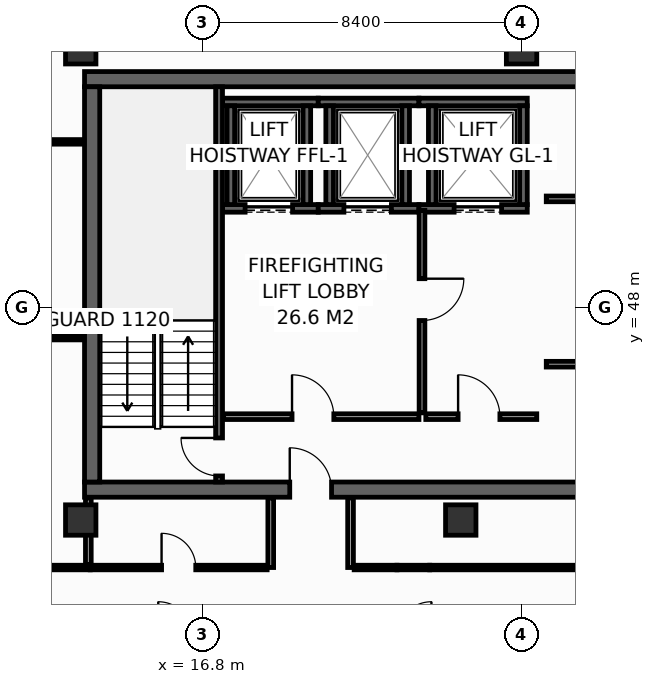
"""IFC4 building model, lengths in metres.
Left out: names, types, materials, properties, quantities, classifications, styles, units other than length and angle.
Written with IfcOpenShell. Run it as: python <this file> out.ifc"""

import sys

from ifc_helpers import new_model, si_unit, direction, frame, frame_2d, origin, origin_2d, place, context, subcontext, project, spatial, rectangle, hollow_rectangle, extrude, element, fill, save


model = new_model("IFC4")
c1 = context("Model", 3, precision=1e-05, world=origin(), true_north=direction((0.0, 1.0)))
c2 = subcontext(c1, "Body", "Model", "MODEL_VIEW")
j1 = project(units=[si_unit("LENGTHUNIT", "METRE"), si_unit("PLANEANGLEUNIT", "RADIAN")], contexts=[c1])
p1 = place(None, origin())
s1 = spatial("IfcSite", under=j1, at=p1, CompositionType="ELEMENT")
p2 = place(p1, origin())
s2 = spatial("IfcBuilding", under=s1, at=p2, CompositionType="ELEMENT")
p3 = place(p2, frame((0.0, 0.0, 249.6)))
s3 = spatial("IfcBuildingStorey", under=s2, at=p3, CompositionType="ELEMENT", Elevation=249.6)
p4 = place(p3, frame((13.7, 43.2, 0.0), z_axis=(0.0, 0.0, 1.0), x_axis=(1.0, 0.0, 0.0)))
e1 = element("IfcWall", 1, at=p4, inside=s3, PredefinedType="SHEAR", context=c2, shape_type="SweptSolid", body=[
    extrude(rectangle(XDim=32.5, YDim=0.4, at=frame_2d((16.25, 0.0))), origin(), (0.0, 0.0, 1.0), 3.35),
])
p5 = place(p4, frame((5.4, 0.0, 0.0)))
e2 = element("IfcOpeningElement", 2, at=p5, cuts=e1, PredefinedType="OPENING", context=c2, shape_type="SweptSolid", body=[
    extrude(rectangle(XDim=1.1, YDim=2.15, at=frame_2d((0.55, 1.075))), frame((0.0, 0.21, 0.0), z_axis=(0.0, -1.0, 0.0), x_axis=(1.0, 0.0, 0.0)), (0.0, 0.0, 1.0), 0.42),
])
p6 = place(p4, frame((25.6, 0.0, 0.0)))
e3 = element("IfcOpeningElement", 3, at=p6, cuts=e1, PredefinedType="OPENING", context=c2, shape_type="SweptSolid", body=[
    extrude(rectangle(XDim=1.1, YDim=2.15, at=frame_2d((0.55, 1.075))), frame((0.0, 0.21, 0.0), z_axis=(0.0, -1.0, 0.0), x_axis=(1.0, 0.0, 0.0)), (0.0, 0.0, 1.0), 0.42),
])
p7 = place(p3, frame((13.7, 54.0, 0.0), z_axis=(0.0, 0.0, 1.0), x_axis=(1.0, 0.0, 0.0)))
e4 = element("IfcWall", 4, at=p7, inside=s3, PredefinedType="SHEAR", context=c2, shape_type="SweptSolid", body=[
    extrude(rectangle(XDim=32.5, YDim=0.4, at=frame_2d((16.25, 0.0))), origin(), (0.0, 0.0, 1.0), 3.35),
])
p8 = place(p3, frame((13.9, 43.4, 0.0), z_axis=(0.0, 0.0, 1.0), x_axis=(0.0, 1.0, 0.0)))
e5 = element("IfcWall", 5, at=p8, inside=s3, PredefinedType="SHEAR", context=c2, shape_type="SweptSolid", body=[
    extrude(rectangle(XDim=10.4, YDim=0.4, at=frame_2d((5.2, 0.0))), origin(), (0.0, 0.0, 1.0), 3.35),
])
for number, where, z_axis, x_axis in (
    (6, (13.6, 54.8, 0.0), (0.0, 0.0, 1.0), (1.0, 0.0, 0.0)),
    (7, (25.2, 54.8, 0.0), (0.0, 0.0, 1.0), (1.0, 0.0, 0.0)),
    (8, (13.6, 42.4, 0.0), (0.0, 0.0, 1.0), (1.0, 0.0, 0.0)),
    (9, (23.6, 42.4, 0.0), (0.0, 0.0, 1.0), (1.0, 0.0, 0.0)),
):
    element("IfcColumn", number, at=place(p3, frame(where, z_axis=z_axis, x_axis=x_axis)), inside=s3, PredefinedType="COLUMN", context=c2, shape_type="SweptSolid", body=[
        extrude(hollow_rectangle(XDim=0.8, YDim=0.8, WallThickness=0.036, at=origin_2d()), origin(), (0.0, 0.0, 1.0), 3.8),
    ])
p9 = place(p3, frame((17.33, 50.6, 0.0), z_axis=(0.0, 0.0, 1.0), x_axis=(1.0, 0.0, 0.0)))
e10 = element("IfcWall", 10, at=p9, inside=s3, PredefinedType="SHEAR", context=c2, shape_type="SweptSolid", body=[
    extrude(rectangle(XDim=2.52, YDim=0.2, at=frame_2d((1.26, 0.0))), origin(), (0.0, 0.0, 1.0), 3.35),
])
p10 = place(p9, frame((0.595, 0.0, 0.0)))
e11 = element("IfcOpeningElement", 11, at=p10, cuts=e10, PredefinedType="OPENING", context=c2, shape_type="SweptSolid", body=[
    extrude(rectangle(XDim=1.25, YDim=2.3, at=frame_2d((0.625, 1.15))), frame((0.0, 0.11, 0.0), z_axis=(0.0, -1.0, 0.0), x_axis=(1.0, 0.0, 0.0)), (0.0, 0.0, 1.0), 0.22),
])
p11 = place(p3, frame((17.33, 53.4, 0.0), z_axis=(0.0, 0.0, 1.0), x_axis=(1.0, 0.0, 0.0)))
e12 = element("IfcWall", 12, at=p11, inside=s3, PredefinedType="SHEAR", context=c2, shape_type="SweptSolid", body=[
    extrude(rectangle(XDim=2.52, YDim=0.2, at=frame_2d((1.26, 0.0))), origin(), (0.0, 0.0, 1.0), 3.35),
])
for number, where, z_axis, x_axis in (
    (13, (17.55, 50.7, 0.0), (0.0, 0.0, 1.0), (0.0, 1.0, 0.0)),
    (14, (19.55, 50.7, 0.0), (0.0, 0.0, 1.0), (0.0, 1.0, 0.0)),
):
    element("IfcWall", number, at=place(p3, frame(where, z_axis=z_axis, x_axis=x_axis)), inside=s3, PredefinedType="SHEAR", context=c2, shape_type="SweptSolid", body=[
        extrude(rectangle(XDim=2.6, YDim=0.2, at=frame_2d((1.3, 0.0))), origin(), (0.0, 0.0, 1.0), 3.35),
    ])
p12 = place(p3, frame((19.85, 50.6, 0.0), z_axis=(0.0, 0.0, 1.0), x_axis=(1.0, 0.0, 0.0)))
e15 = element("IfcWall", 15, at=p12, inside=s3, PredefinedType="SHEAR", context=c2, shape_type="SweptSolid", body=[
    extrude(rectangle(XDim=2.65, YDim=0.2, at=frame_2d((1.325, 0.0))), origin(), (0.0, 0.0, 1.0), 3.35),
])
p13 = place(p12, frame((0.675, 0.0, 0.0)))
e16 = element("IfcOpeningElement", 16, at=p13, cuts=e15, PredefinedType="OPENING", context=c2, shape_type="SweptSolid", body=[
    extrude(rectangle(XDim=1.25, YDim=2.3, at=frame_2d((0.625, 1.15))), frame((0.0, 0.11, 0.0), z_axis=(0.0, -1.0, 0.0), x_axis=(1.0, 0.0, 0.0)), (0.0, 0.0, 1.0), 0.22),
])
p14 = place(p3, frame((19.85, 53.4, 0.0), z_axis=(0.0, 0.0, 1.0), x_axis=(1.0, 0.0, 0.0)))
e17 = element("IfcWall", 17, at=p14, inside=s3, PredefinedType="SHEAR", context=c2, shape_type="SweptSolid", body=[
    extrude(rectangle(XDim=2.65, YDim=0.2, at=frame_2d((1.325, 0.0))), origin(), (0.0, 0.0, 1.0), 3.35),
])
for number, where, z_axis, x_axis in (
    (18, (20.15, 50.7, 0.0), (0.0, 0.0, 1.0), (0.0, 1.0, 0.0)),
    (19, (22.15, 50.7, 0.0), (0.0, 0.0, 1.0), (0.0, 1.0, 0.0)),
):
    element("IfcWall", number, at=place(p3, frame(where, z_axis=z_axis, x_axis=x_axis)), inside=s3, PredefinedType="SHEAR", context=c2, shape_type="SweptSolid", body=[
        extrude(rectangle(XDim=2.6, YDim=0.2, at=frame_2d((1.3, 0.0))), origin(), (0.0, 0.0, 1.0), 3.35),
    ])
p15 = place(p3, frame((22.5, 50.6, 0.0), z_axis=(0.0, 0.0, 1.0), x_axis=(1.0, 0.0, 0.0)))
e20 = element("IfcWall", 20, at=p15, inside=s3, PredefinedType="SHEAR", context=c2, shape_type="SweptSolid", body=[
    extrude(rectangle(XDim=2.85, YDim=0.2, at=frame_2d((1.425, 0.0))), origin(), (0.0, 0.0, 1.0), 3.35),
])
p16 = place(p15, frame((0.925, 0.0, 0.0)))
e21 = element("IfcOpeningElement", 21, at=p16, cuts=e20, PredefinedType="OPENING", context=c2, shape_type="SweptSolid", body=[
    extrude(rectangle(XDim=1.25, YDim=2.3, at=frame_2d((0.625, 1.15))), frame((0.0, 0.11, 0.0), z_axis=(0.0, -1.0, 0.0), x_axis=(1.0, 0.0, 0.0)), (0.0, 0.0, 1.0), 0.22),
])
p17 = place(p3, frame((22.5, 53.4, 0.0), z_axis=(0.0, 0.0, 1.0), x_axis=(1.0, 0.0, 0.0)))
e22 = element("IfcWall", 22, at=p17, inside=s3, PredefinedType="SHEAR", context=c2, shape_type="SweptSolid", body=[
    extrude(rectangle(XDim=2.85, YDim=0.2, at=frame_2d((1.425, 0.0))), origin(), (0.0, 0.0, 1.0), 3.35),
])
for number, where, z_axis, x_axis in (
    (23, (22.85, 50.7, 0.0), (0.0, 0.0, 1.0), (0.0, 1.0, 0.0)),
    (24, (25.25, 50.7, 0.0), (0.0, 0.0, 1.0), (0.0, 1.0, 0.0)),
):
    element("IfcWall", number, at=place(p3, frame(where, z_axis=z_axis, x_axis=x_axis)), inside=s3, PredefinedType="SHEAR", context=c2, shape_type="SweptSolid", body=[
        extrude(rectangle(XDim=2.6, YDim=0.2, at=frame_2d((1.3, 0.0))), origin(), (0.0, 0.0, 1.0), 3.35),
    ])
p18 = place(p3, frame((17.24, 43.4, 0.0), z_axis=(0.0, 0.0, 1.0), x_axis=(0.0, 1.0, 0.0)))
e25 = element("IfcWall", 25, at=p18, inside=s3, PredefinedType="SHEAR", context=c2, shape_type="SweptSolid", body=[
    extrude(rectangle(XDim=10.4, YDim=0.18, at=frame_2d((5.2, 0.0))), origin(), (0.0, 0.0, 1.0), 3.35),
])
p19 = place(p18, frame((0.16, 0.0, 0.0)))
e26 = element("IfcOpeningElement", 26, at=p19, cuts=e25, PredefinedType="OPENING", context=c2, shape_type="SweptSolid", body=[
    extrude(rectangle(XDim=1.0, YDim=2.15, at=frame_2d((0.5, 1.075))), frame((0.0, 0.1, 0.0), z_axis=(0.0, -1.0, 0.0), x_axis=(1.0, 0.0, 0.0)), (0.0, 0.0, 1.0), 0.2),
])
p20 = place(p3, frame((17.36, 45.12, 0.0), z_axis=(0.0, 0.0, 1.0), x_axis=(1.0, 0.0, 0.0)))
e27 = element("IfcWall", 27, at=p20, inside=s3, PredefinedType="PARTITIONING", context=c2, shape_type="SweptSolid", body=[
    extrude(rectangle(XDim=5.14, YDim=0.15, at=frame_2d((2.57, 0.0))), origin(), (0.0, 0.0, 1.0), 3.35),
])
p21 = place(p20, frame((1.8, 0.0, 0.0)))
e28 = element("IfcOpeningElement", 28, at=p21, cuts=e27, PredefinedType="OPENING", context=c2, shape_type="SweptSolid", body=[
    extrude(rectangle(XDim=1.1, YDim=2.15, at=frame_2d((0.55, 1.075))), frame((0.0, 0.085, 0.0), z_axis=(0.0, -1.0, 0.0), x_axis=(1.0, 0.0, 0.0)), (0.0, 0.0, 1.0), 0.17),
])
p22 = place(p3, frame((22.58, 50.55, 0.0), z_axis=(0.0, 0.0, 1.0), x_axis=(0.0, -1.0, 0.0)))
e29 = element("IfcWall", 29, at=p22, inside=s3, PredefinedType="PARTITIONING", context=c2, shape_type="SweptSolid", body=[
    extrude(rectangle(XDim=5.33, YDim=0.15, at=frame_2d((2.665, 0.0))), origin(), (0.0, 0.0, 1.0), 3.35),
])
p23 = place(p22, frame((1.8, 0.0, 0.0)))
e30 = element("IfcOpeningElement", 30, at=p23, cuts=e29, PredefinedType="OPENING", context=c2, shape_type="SweptSolid", body=[
    extrude(rectangle(XDim=1.1, YDim=2.15, at=frame_2d((0.55, 1.075))), frame((0.0, 0.085, 0.0), z_axis=(0.0, -1.0, 0.0), x_axis=(1.0, 0.0, 0.0)), (0.0, 0.0, 1.0), 0.17),
])
p24 = place(p3, frame((22.68, 45.12, 0.0), z_axis=(0.0, 0.0, 1.0), x_axis=(1.0, 0.0, 0.0)))
e31 = element("IfcWall", 31, at=p24, inside=s3, PredefinedType="PARTITIONING", context=c2, shape_type="SweptSolid", body=[
    extrude(rectangle(XDim=2.92, YDim=0.15, at=frame_2d((1.46, 0.0))), origin(), (0.0, 0.0, 1.0), 3.35),
])
p25 = place(p24, frame((0.85, 0.0, 0.0)))
e32 = element("IfcOpeningElement", 32, at=p25, cuts=e31, PredefinedType="OPENING", context=c2, shape_type="SweptSolid", body=[
    extrude(rectangle(XDim=1.1, YDim=2.15, at=frame_2d((0.55, 1.075))), frame((0.0, 0.085, 0.0), z_axis=(0.0, -1.0, 0.0), x_axis=(1.0, 0.0, 0.0)), (0.0, 0.0, 1.0), 0.17),
])
p26 = place(p3, frame((25.85, 50.85, 0.0), z_axis=(0.0, 0.0, 1.0), x_axis=(1.0, 0.0, 0.0)))
e33 = element("IfcWall", 33, at=p26, inside=s3, PredefinedType="PARTITIONING", context=c2, shape_type="SweptSolid", body=[
    extrude(rectangle(XDim=7.65, YDim=0.15, at=frame_2d((3.825, 0.0))), origin(), (0.0, 0.0, 1.0), 3.35),
])
p27 = place(p26, frame((1.25, 0.0, 0.0)))
e34 = element("IfcOpeningElement", 34, at=p27, cuts=e33, PredefinedType="OPENING", context=c2, shape_type="SweptSolid", body=[
    extrude(rectangle(XDim=0.95, YDim=2.15, at=frame_2d((0.475, 1.075))), frame((0.0, 0.085, 0.0), z_axis=(0.0, -1.0, 0.0), x_axis=(1.0, 0.0, 0.0)), (0.0, 0.0, 1.0), 0.17),
])
p28 = place(p3, frame((25.85, 46.5, 0.0), z_axis=(0.0, 0.0, 1.0), x_axis=(1.0, 0.0, 0.0)))
e35 = element("IfcWall", 35, at=p28, inside=s3, PredefinedType="PARTITIONING", context=c2, shape_type="SweptSolid", body=[
    extrude(rectangle(XDim=7.65, YDim=0.15, at=frame_2d((3.825, 0.0))), origin(), (0.0, 0.0, 1.0), 3.35),
])
p29 = place(p28, frame((2.8, 0.0, 0.0)))
e36 = element("IfcOpeningElement", 36, at=p29, cuts=e35, PredefinedType="OPENING", context=c2, shape_type="SweptSolid", body=[
    extrude(rectangle(XDim=0.95, YDim=2.15, at=frame_2d((0.475, 1.075))), frame((0.0, 0.085, 0.0), z_axis=(0.0, -1.0, 0.0), x_axis=(1.0, 0.0, 0.0)), (0.0, 0.0, 1.0), 0.17),
])
p30 = place(p3, frame((11.5, 41.15, 0.0), z_axis=(0.0, 0.0, 1.0), x_axis=(1.0, 0.0, 0.0)))
e37 = element("IfcWall", 37, at=p30, inside=s3, PredefinedType="PARTITIONING", context=c2, shape_type="SweptSolid", body=[
    extrude(rectangle(XDim=2.35, YDim=0.12, at=frame_2d((1.175, 0.0))), origin(), (0.0, 0.0, 1.0), 3.35),
])
for number, where, z_axis, x_axis in (
    (38, (11.55, 52.35, 0.0), (0.0, 0.0, 1.0), (1.0, 0.0, 0.0)),
    (39, (11.55, 47.2, 0.0), (0.0, 0.0, 1.0), (1.0, 0.0, 0.0)),
):
    element("IfcWall", number, at=place(p3, frame(where, z_axis=z_axis, x_axis=x_axis)), inside=s3, PredefinedType="PARTITIONING", context=c2, shape_type="SweptSolid", body=[
        extrude(rectangle(XDim=2.13, YDim=0.12, at=frame_2d((1.065, 0.0))), origin(), (0.0, 0.0, 1.0), 3.35),
    ])
p31 = place(p3, frame((13.8, 41.23, 0.0), z_axis=(0.0, 0.0, 1.0), x_axis=(0.0, 1.0, 0.0)))
e40 = element("IfcWall", 40, at=p31, inside=s3, PredefinedType="PARTITIONING", context=c2, shape_type="SweptSolid", body=[
    extrude(rectangle(XDim=1.75, YDim=0.15, at=frame_2d((0.875, 0.0))), origin(), (0.0, 0.0, 1.0), 3.35),
])
for number, where, z_axis, x_axis in (
    (41, (18.6, 41.15, 0.0), (0.0, 0.0, 1.0), (0.0, 1.0, 0.0)),
    (42, (20.7, 41.15, 0.0), (0.0, 0.0, 1.0), (0.0, 1.0, 0.0)),
):
    element("IfcWall", number, at=place(p3, frame(where, z_axis=z_axis, x_axis=x_axis)), inside=s3, PredefinedType="PARTITIONING", context=c2, shape_type="SweptSolid", body=[
        extrude(rectangle(XDim=1.83, YDim=0.15, at=frame_2d((0.915, 0.0))), origin(), (0.0, 0.0, 1.0), 3.35),
    ])
p32 = place(p3, frame((13.85, 41.15, 0.0), z_axis=(0.0, 0.0, 1.0), x_axis=(1.0, 0.0, 0.0)))
e43 = element("IfcWall", 43, at=p32, inside=s3, PredefinedType="PARTITIONING", context=c2, shape_type="SweptSolid", body=[
    extrude(rectangle(XDim=4.655, YDim=0.12, at=frame_2d((2.327, 0.0))), origin(), (0.0, 0.0, 1.0), 3.35),
])
p33 = place(p32, frame((1.877, 0.0, 0.0)))
e44 = element("IfcOpeningElement", 44, at=p33, cuts=e43, PredefinedType="OPENING", context=c2, shape_type="SweptSolid", body=[
    extrude(rectangle(XDim=0.9, YDim=2.1, at=frame_2d((0.45, 1.05))), frame((0.0, 0.07, 0.0), z_axis=(0.0, -1.0, 0.0), x_axis=(1.0, 0.0, 0.0)), (0.0, 0.0, 1.0), 0.14),
])
p34 = place(p3, frame((22.783, 41.15, 0.0), z_axis=(0.0, 0.0, 1.0), x_axis=(1.0, 0.0, 0.0)))
e45 = element("IfcWall", 45, at=p34, inside=s3, PredefinedType="PARTITIONING", context=c2, shape_type="SweptSolid", body=[
    extrude(rectangle(XDim=14.434, YDim=0.12, at=frame_2d((7.217, 0.0))), origin(), (0.0, 0.0, 1.0), 3.35),
])
p35 = place(p34, frame((6.767, 0.0, 0.0)))
e46 = element("IfcOpeningElement", 46, at=p35, cuts=e45, PredefinedType="OPENING", context=c2, shape_type="SweptSolid", body=[
    extrude(rectangle(XDim=0.9, YDim=2.1, at=frame_2d((0.45, 1.05))), frame((0.0, 0.07, 0.0), z_axis=(0.0, -1.0, 0.0), x_axis=(1.0, 0.0, 0.0)), (0.0, 0.0, 1.0), 0.14),
])
p36 = place(p3, frame((20.795, 41.15, 0.0), z_axis=(0.0, 0.0, 1.0), x_axis=(1.0, 0.0, 0.0)))
e47 = element("IfcWall", 47, at=p36, inside=s3, PredefinedType="PARTITIONING", context=c2, shape_type="SweptSolid", body=[
    extrude(rectangle(XDim=1.126, YDim=0.12, at=frame_2d((0.563, 0.0))), origin(), (0.0, 0.0, 1.0), 3.35),
])
p37 = place(p3, frame((21.921, 41.15, 0.0), z_axis=(0.0, 0.0, 1.0), x_axis=(1.0, 0.0, 0.0)))
e48 = element("IfcWall", 48, at=p37, inside=s3, PredefinedType="PARTITIONING", context=c2, shape_type="SweptSolid", body=[
    extrude(rectangle(XDim=0.862, YDim=0.12, at=frame_2d((0.431, 0.0))), origin(), (0.0, 0.0, 1.0), 1.935),
])
p38 = place(p10, origin())
e49 = element("IfcDoor", 49, at=p38, inside=s3, OperationType="SLIDING_TO_LEFT", PredefinedType="DOOR", context=c2, shape_type="SweptSolid", body=[
    extrude(rectangle(XDim=1.25, YDim=2.3, at=frame_2d((0.625, 1.15))), frame((0.0, 0.025, 0.0), z_axis=(0.0, -1.0, 0.0), x_axis=(1.0, 0.0, 0.0)), (0.0, 0.0, 1.0), 0.05),
])
fill(e11, e49)
p39 = place(p13, origin())
e50 = element("IfcDoor", 50, at=p39, inside=s3, OperationType="SLIDING_TO_LEFT", PredefinedType="DOOR", context=c2, shape_type="SweptSolid", body=[
    extrude(rectangle(XDim=1.25, YDim=2.3, at=frame_2d((0.625, 1.15))), frame((0.0, 0.025, 0.0), z_axis=(0.0, -1.0, 0.0), x_axis=(1.0, 0.0, 0.0)), (0.0, 0.0, 1.0), 0.05),
])
fill(e16, e50)
p40 = place(p16, origin())
e51 = element("IfcDoor", 51, at=p40, inside=s3, OperationType="SLIDING_TO_LEFT", PredefinedType="DOOR", context=c2, shape_type="SweptSolid", body=[
    extrude(rectangle(XDim=1.25, YDim=2.3, at=frame_2d((0.625, 1.15))), frame((0.0, 0.025, 0.0), z_axis=(0.0, -1.0, 0.0), x_axis=(1.0, 0.0, 0.0)), (0.0, 0.0, 1.0), 0.05),
])
fill(e21, e51)
p41 = place(p19, origin())
e52 = element("IfcDoor", 52, at=p41, inside=s3, OperationType="SINGLE_SWING_RIGHT", PredefinedType="DOOR", context=c2, shape_type="SweptSolid", body=[
    extrude(rectangle(XDim=1.0, YDim=2.15, at=frame_2d((0.5, 1.075))), frame((0.0, 0.025, 0.0), z_axis=(0.0, -1.0, 0.0), x_axis=(1.0, 0.0, 0.0)), (0.0, 0.0, 1.0), 0.05),
])
fill(e26, e52)
p42 = place(p21, origin())
e53 = element("IfcDoor", 53, at=p42, inside=s3, OperationType="SINGLE_SWING_LEFT", PredefinedType="DOOR", context=c2, shape_type="SweptSolid", body=[
    extrude(rectangle(XDim=1.1, YDim=2.15, at=frame_2d((0.55, 1.075))), frame((0.0, 0.025, 0.0), z_axis=(0.0, -1.0, 0.0), x_axis=(1.0, 0.0, 0.0)), (0.0, 0.0, 1.0), 0.05),
])
fill(e28, e53)
p43 = place(p23, origin())
e54 = element("IfcDoor", 54, at=p43, inside=s3, OperationType="SINGLE_SWING_LEFT", PredefinedType="DOOR", context=c2, shape_type="SweptSolid", body=[
    extrude(rectangle(XDim=1.1, YDim=2.15, at=frame_2d((0.55, 1.075))), frame((0.0, 0.025, 0.0), z_axis=(0.0, -1.0, 0.0), x_axis=(1.0, 0.0, 0.0)), (0.0, 0.0, 1.0), 0.05),
])
fill(e30, e54)
p44 = place(p25, origin())
e55 = element("IfcDoor", 55, at=p44, inside=s3, OperationType="SINGLE_SWING_LEFT", PredefinedType="DOOR", context=c2, shape_type="SweptSolid", body=[
    extrude(rectangle(XDim=1.1, YDim=2.15, at=frame_2d((0.55, 1.075))), frame((0.0, 0.025, 0.0), z_axis=(0.0, -1.0, 0.0), x_axis=(1.0, 0.0, 0.0)), (0.0, 0.0, 1.0), 0.05),
])
fill(e32, e55)
p45 = place(p5, origin())
e56 = element("IfcDoor", 56, at=p45, inside=s3, OperationType="SINGLE_SWING_LEFT", PredefinedType="DOOR", context=c2, shape_type="SweptSolid", body=[
    extrude(rectangle(XDim=1.1, YDim=2.15, at=frame_2d((0.55, 1.075))), frame((0.0, 0.025, 0.0), z_axis=(0.0, -1.0, 0.0), x_axis=(1.0, 0.0, 0.0)), (0.0, 0.0, 1.0), 0.05),
])
fill(e2, e56)
p46 = place(p33, origin())
e57 = element("IfcDoor", 57, at=p46, inside=s3, OperationType="SINGLE_SWING_LEFT", PredefinedType="DOOR", context=c2, shape_type="SweptSolid", body=[
    extrude(rectangle(XDim=0.9, YDim=2.1, at=frame_2d((0.45, 1.05))), frame((0.0, 0.025, 0.0), z_axis=(0.0, -1.0, 0.0), x_axis=(1.0, 0.0, 0.0)), (0.0, 0.0, 1.0), 0.05),
])
fill(e44, e57)
save(model, sys.argv[1])
